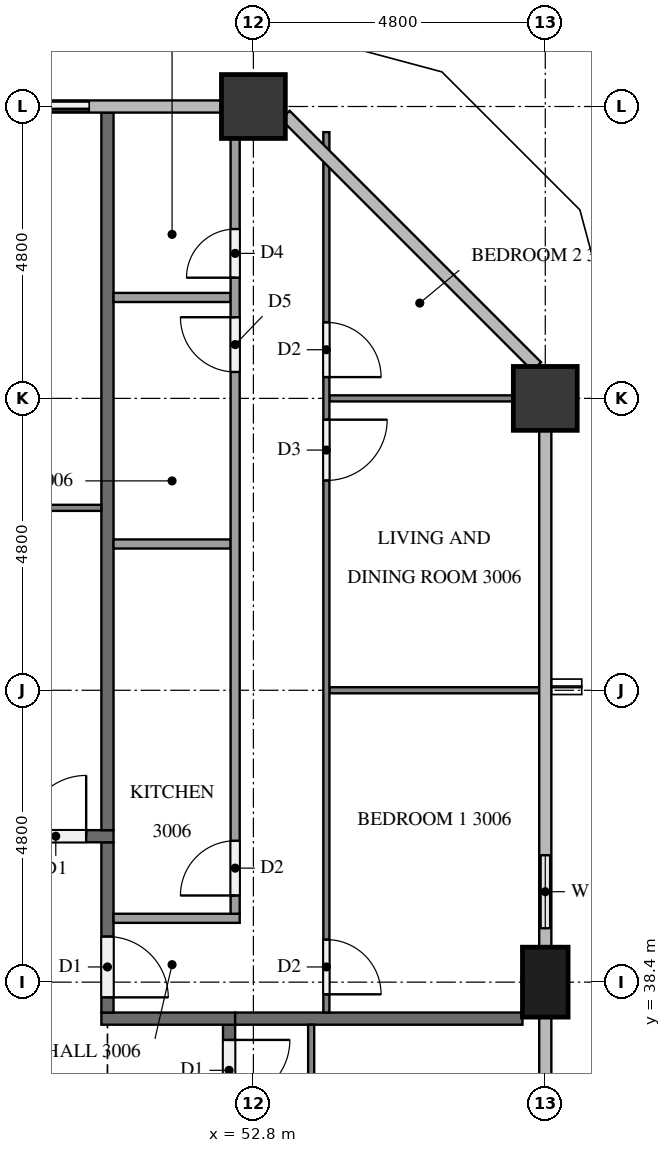
"""IFC4 building model, lengths in metres.
Left out: names, types, materials, properties, quantities, classifications, styles, units other than length and angle.
Written with IfcOpenShell. Run it as: python <this file> out.ifc"""

import sys

from ifc_helpers import new_model, si_unit, direction, frame, frame_2d, origin, origin_2d, place, context, subcontext, project, spatial, rectangle, extrude, element, fill, save


model = new_model("IFC4")
c1 = context("Model", 3, precision=1e-05, world=origin(), true_north=direction((0.0, 1.0)))
c2 = subcontext(c1, "Body", "Model", "MODEL_VIEW")
j1 = project(units=[si_unit("LENGTHUNIT", "METRE"), si_unit("PLANEANGLEUNIT", "RADIAN")], contexts=[c1])
p1 = place(None, origin())
s1 = spatial("IfcSite", under=j1, at=p1, CompositionType="ELEMENT")
p2 = place(p1, origin())
s2 = spatial("IfcBuilding", under=s1, at=p2, CompositionType="ELEMENT")
p3 = place(p2, frame((0.0, 0.0, 119.1)))
s3 = spatial("IfcBuildingStorey", under=s2, at=p3, CompositionType="ELEMENT", Elevation=119.1)
p4 = place(p3, frame((57.6, 38.4, 0.0), z_axis=(0.0, 0.0, 1.0), x_axis=(0.0, 1.0, 0.0)))
e1 = element("IfcColumn", 1, at=p4, inside=s3, PredefinedType="COLUMN", context=c2, shape_type="SweptSolid", body=[
    extrude(rectangle(XDim=1.15, YDim=0.75, at=origin_2d()), origin(), (0.0, 0.0, 1.0), 3.2),
])
for number, where, z_axis, x_axis in (
    (2, (57.6, 48.0, 0.0), (0.0, 0.0, 1.0), (1.0, 0.0, 0.0)),
    (3, (52.8, 52.8, 0.0), (0.0, 0.0, 1.0), (1.0, 0.0, 0.0)),
):
    element("IfcColumn", number, at=place(p3, frame(where, z_axis=z_axis, x_axis=x_axis)), inside=s3, PredefinedType="COLUMN", context=c2, shape_type="SweptSolid", body=[
        extrude(rectangle(XDim=1.05, YDim=1.05, at=origin_2d()), origin(), (0.0, 0.0, 1.0), 3.2),
    ])
p5 = place(p3, frame((57.6, 38.975, 0.0), z_axis=(0.0, 0.0, 1.0), x_axis=(0.0, 1.0, 0.0)))
e4 = element("IfcWall", 4, at=p5, inside=s3, PredefinedType="SOLIDWALL", context=c2, shape_type="SweptSolid", body=[
    extrude(rectangle(XDim=1.825, YDim=0.15, at=frame_2d((0.913, 0.0))), origin(), (0.0, 0.0, 1.0), 3.2),
])
p6 = place(p5, frame((0.312, 0.0, 0.9)))
e5 = element("IfcOpeningElement", 5, at=p6, cuts=e4, PredefinedType="OPENING", context=c2, shape_type="SweptSolid", body=[
    extrude(rectangle(XDim=1.2, YDim=1.4, at=frame_2d((0.6, 0.7))), frame((0.0, 0.085, 0.0), z_axis=(0.0, -1.0, 0.0), x_axis=(1.0, 0.0, 0.0)), (0.0, 0.0, 1.0), 0.17),
])
p7 = place(p3, frame((50.4, 52.8, 0.0), z_axis=(0.0, 0.0, 1.0), x_axis=(-1.0, 0.0, 0.0)))
e6 = element("IfcWall", 6, at=p7, inside=s3, PredefinedType="SOLIDWALL", context=c2, shape_type="SweptSolid", body=[
    extrude(rectangle(XDim=2.4, YDim=0.15, at=frame_2d((1.2, 0.0))), origin(), (0.0, 0.0, 1.0), 3.2),
])
p8 = place(p7, frame((0.3, 0.0, 0.0)))
e7 = element("IfcOpeningElement", 7, at=p8, cuts=e6, PredefinedType="OPENING", context=c2, shape_type="SweptSolid", body=[
    extrude(rectangle(XDim=1.8, YDim=2.4, at=frame_2d((0.9, 1.2))), frame((0.0, 0.085, 0.0), z_axis=(0.0, -1.0, 0.0), x_axis=(1.0, 0.0, 0.0)), (0.0, 0.0, 1.0), 0.17),
])
p9 = place(p3, frame((52.4, 37.7, 0.0), z_axis=(0.0, 0.0, 1.0), x_axis=(0.0, -1.0, 0.0)))
e8 = element("IfcWall", 8, at=p9, inside=s3, PredefinedType="PARTITIONING", context=c2, shape_type="SweptSolid", body=[
    extrude(rectangle(XDim=22.6, YDim=0.2, at=frame_2d((11.3, 0.0))), origin(), (0.0, 0.0, 1.0), 3.2),
])
p10 = place(p9, frame((0.25, 0.0, 0.0)))
e9 = element("IfcOpeningElement", 9, at=p10, cuts=e8, PredefinedType="OPENING", context=c2, shape_type="SweptSolid", body=[
    extrude(rectangle(XDim=1.0, YDim=2.1, at=frame_2d((0.5, 1.05))), frame((0.0, 0.11, 0.0), z_axis=(0.0, -1.0, 0.0), x_axis=(1.0, 0.0, 0.0)), (0.0, 0.0, 1.0), 0.22),
])
p11 = place(p3, frame((52.5, 37.8, 0.0), z_axis=(0.0, 0.0, 1.0), x_axis=(-1.0, 0.0, 0.0)))
e10 = element("IfcWall", 10, at=p11, inside=s3, PredefinedType="PARTITIONING", context=c2, shape_type="SweptSolid", body=[
    extrude(rectangle(XDim=2.2, YDim=0.2, at=frame_2d((1.1, 0.0))), origin(), (0.0, 0.0, 1.0), 3.2),
])
p12 = place(p3, frame((50.4, 40.7, 0.0), z_axis=(0.0, 0.0, 1.0), x_axis=(0.0, -1.0, 0.0)))
e11 = element("IfcWall", 11, at=p12, inside=s3, PredefinedType="PARTITIONING", context=c2, shape_type="SweptSolid", body=[
    extrude(rectangle(XDim=2.8, YDim=0.2, at=frame_2d((1.4, 0.0))), origin(), (0.0, 0.0, 1.0), 3.2),
])
p13 = place(p12, frame((1.55, 0.0, 0.0)))
e12 = element("IfcOpeningElement", 12, at=p13, cuts=e11, PredefinedType="OPENING", context=c2, shape_type="SweptSolid", body=[
    extrude(rectangle(XDim=1.0, YDim=2.1, at=frame_2d((0.5, 1.05))), frame((0.0, 0.11, 0.0), z_axis=(0.0, -1.0, 0.0), x_axis=(1.0, 0.0, 0.0)), (0.0, 0.0, 1.0), 0.22),
])
p14 = place(p3, frame((11.9, 40.8, 0.0), z_axis=(0.0, 0.0, 1.0), x_axis=(1.0, 0.0, 0.0)))
e13 = element("IfcWall", 13, at=p14, inside=s3, PredefinedType="PARTITIONING", context=c2, shape_type="SweptSolid", body=[
    extrude(rectangle(XDim=38.6, YDim=0.2, at=frame_2d((19.3, 0.0))), origin(), (0.0, 0.0, 1.0), 3.2),
])
p15 = place(p14, frame((37.15, 0.0, 0.0)))
e14 = element("IfcOpeningElement", 14, at=p15, cuts=e13, PredefinedType="OPENING", context=c2, shape_type="SweptSolid", body=[
    extrude(rectangle(XDim=1.0, YDim=2.1, at=frame_2d((0.5, 1.05))), frame((0.0, 0.11, 0.0), z_axis=(0.0, -1.0, 0.0), x_axis=(1.0, 0.0, 0.0)), (0.0, 0.0, 1.0), 0.22),
])
p16 = place(p14, frame((27.55, 0.0, 0.0)))
e15 = element("IfcOpeningElement", 15, at=p16, cuts=e13, PredefinedType="OPENING", context=c2, shape_type="SweptSolid", body=[
    extrude(rectangle(XDim=1.0, YDim=2.1, at=frame_2d((0.5, 1.05))), frame((0.0, 0.11, 0.0), z_axis=(0.0, -1.0, 0.0), x_axis=(1.0, 0.0, 0.0)), (0.0, 0.0, 1.0), 0.22),
])
p17 = place(p14, frame((13.15, 0.0, 0.0)))
e16 = element("IfcOpeningElement", 16, at=p17, cuts=e13, PredefinedType="OPENING", context=c2, shape_type="SweptSolid", body=[
    extrude(rectangle(XDim=1.0, YDim=2.1, at=frame_2d((0.5, 1.05))), frame((0.0, 0.11, 0.0), z_axis=(0.0, -1.0, 0.0), x_axis=(1.0, 0.0, 0.0)), (0.0, 0.0, 1.0), 0.22),
])
p18 = place(p3, frame((52.5, 37.8, 0.0), z_axis=(0.0, 0.0, 1.0), x_axis=(1.0, 0.0, 0.0)))
e17 = element("IfcWall", 17, at=p18, inside=s3, PredefinedType="PARTITIONING", context=c2, shape_type="SweptSolid", body=[
    extrude(rectangle(XDim=4.725, YDim=0.2, at=frame_2d((2.363, 0.0))), origin(), (0.0, 0.0, 1.0), 3.2),
])
p19 = place(p3, frame((50.4, 40.9, 0.0), z_axis=(0.0, 0.0, 1.0), x_axis=(0.0, 1.0, 0.0)))
e18 = element("IfcWall", 18, at=p19, inside=s3, PredefinedType="PARTITIONING", context=c2, shape_type="SweptSolid", body=[
    extrude(rectangle(XDim=11.8, YDim=0.2, at=frame_2d((5.9, 0.0))), origin(), (0.0, 0.0, 1.0), 3.2),
])
p20 = place(p3, frame((53.75, 37.7, 0.0), z_axis=(0.0, 0.0, 1.0), x_axis=(0.0, -1.0, 0.0)))
e19 = element("IfcWall", 19, at=p20, inside=s3, PredefinedType="PARTITIONING", context=c2, shape_type="SweptSolid", body=[
    extrude(rectangle(XDim=22.6, YDim=0.1, at=frame_2d((11.3, 0.0))), origin(), (0.0, 0.0, 1.0), 3.2),
])
p21 = place(p20, frame((2.85, 0.0, 0.0)))
e20 = element("IfcOpeningElement", 20, at=p21, cuts=e19, PredefinedType="OPENING", context=c2, shape_type="SweptSolid", body=[
    extrude(rectangle(XDim=0.9, YDim=2.1, at=frame_2d((0.45, 1.05))), frame((0.0, 0.06, 0.0), z_axis=(0.0, -1.0, 0.0), x_axis=(1.0, 0.0, 0.0)), (0.0, 0.0, 1.0), 0.12),
])
p22 = place(p20, frame((4.45, 0.0, 0.0)))
e21 = element("IfcOpeningElement", 21, at=p22, cuts=e19, PredefinedType="OPENING", context=c2, shape_type="SweptSolid", body=[
    extrude(rectangle(XDim=0.8, YDim=2.1, at=frame_2d((0.4, 1.05))), frame((0.0, 0.06, 0.0), z_axis=(0.0, -1.0, 0.0), x_axis=(1.0, 0.0, 0.0)), (0.0, 0.0, 1.0), 0.12),
])
p23 = place(p20, frame((7.65, 0.0, 0.0)))
e22 = element("IfcOpeningElement", 22, at=p23, cuts=e19, PredefinedType="OPENING", context=c2, shape_type="SweptSolid", body=[
    extrude(rectangle(XDim=0.9, YDim=2.1, at=frame_2d((0.45, 1.05))), frame((0.0, 0.06, 0.0), z_axis=(0.0, -1.0, 0.0), x_axis=(1.0, 0.0, 0.0)), (0.0, 0.0, 1.0), 0.12),
])
p24 = place(p20, frame((9.25, 0.0, 0.0)))
e23 = element("IfcOpeningElement", 23, at=p24, cuts=e19, PredefinedType="OPENING", context=c2, shape_type="SweptSolid", body=[
    extrude(rectangle(XDim=0.9, YDim=2.1, at=frame_2d((0.45, 1.05))), frame((0.0, 0.06, 0.0), z_axis=(0.0, -1.0, 0.0), x_axis=(1.0, 0.0, 0.0)), (0.0, 0.0, 1.0), 0.12),
])
p25 = place(p20, frame((17.15, 0.0, 0.0)))
e24 = element("IfcOpeningElement", 24, at=p25, cuts=e19, PredefinedType="OPENING", context=c2, shape_type="SweptSolid", body=[
    extrude(rectangle(XDim=1.0, YDim=2.1, at=frame_2d((0.5, 1.05))), frame((0.0, 0.06, 0.0), z_axis=(0.0, -1.0, 0.0), x_axis=(1.0, 0.0, 0.0)), (0.0, 0.0, 1.0), 0.12),
])
p26 = place(p20, frame((18.85, 0.0, 0.0)))
e25 = element("IfcOpeningElement", 25, at=p26, cuts=e19, PredefinedType="OPENING", context=c2, shape_type="SweptSolid", body=[
    extrude(rectangle(XDim=0.9, YDim=2.1, at=frame_2d((0.45, 1.05))), frame((0.0, 0.06, 0.0), z_axis=(0.0, -1.0, 0.0), x_axis=(1.0, 0.0, 0.0)), (0.0, 0.0, 1.0), 0.12),
])
p27 = place(p3, frame((54.05, 43.2, 0.0), z_axis=(0.0, 0.0, 1.0), x_axis=(1.0, 0.0, 0.0)))
e26 = element("IfcWall", 26, at=p27, inside=s3, PredefinedType="PARTITIONING", context=c2, shape_type="SweptSolid", body=[
    extrude(rectangle(XDim=3.45, YDim=0.1, at=frame_2d((1.725, 0.0))), origin(), (0.0, 0.0, 1.0), 3.2),
])
p28 = place(p3, frame((54.05, 48.0, 0.0), z_axis=(0.0, 0.0, 1.0), x_axis=(1.0, 0.0, 0.0)))
e27 = element("IfcWall", 27, at=p28, inside=s3, PredefinedType="PARTITIONING", context=c2, shape_type="SweptSolid", body=[
    extrude(rectangle(XDim=3.025, YDim=0.1, at=frame_2d((1.512, 0.0))), origin(), (0.0, 0.0, 1.0), 3.2),
])
p29 = place(p3, frame((54.0, 52.378, 0.0), z_axis=(0.0, 0.0, 1.0), x_axis=(0.0, -1.0, 0.0)))
e28 = element("IfcWall", 28, at=p29, inside=s3, PredefinedType="PARTITIONING", context=c2, shape_type="SweptSolid", body=[
    extrude(rectangle(XDim=14.479, YDim=0.1, at=frame_2d((7.239, 0.0))), origin(), (0.0, 0.0, 1.0), 3.2),
])
p30 = place(p29, frame((13.279, 0.0, 0.0)))
e29 = element("IfcOpeningElement", 29, at=p30, cuts=e28, PredefinedType="OPENING", context=c2, shape_type="SweptSolid", body=[
    extrude(rectangle(XDim=0.9, YDim=2.1, at=frame_2d((0.45, 1.05))), frame((0.0, 0.06, 0.0), z_axis=(0.0, -1.0, 0.0), x_axis=(1.0, 0.0, 0.0)), (0.0, 0.0, 1.0), 0.12),
])
p31 = place(p29, frame((4.729, 0.0, 0.0)))
e30 = element("IfcOpeningElement", 30, at=p31, cuts=e28, PredefinedType="OPENING", context=c2, shape_type="SweptSolid", body=[
    extrude(rectangle(XDim=1.0, YDim=2.1, at=frame_2d((0.5, 1.05))), frame((0.0, 0.06, 0.0), z_axis=(0.0, -1.0, 0.0), x_axis=(1.0, 0.0, 0.0)), (0.0, 0.0, 1.0), 0.12),
])
p32 = place(p29, frame((3.128, 0.0, 0.0)))
e31 = element("IfcOpeningElement", 31, at=p32, cuts=e28, PredefinedType="OPENING", context=c2, shape_type="SweptSolid", body=[
    extrude(rectangle(XDim=0.9, YDim=2.1, at=frame_2d((0.45, 1.05))), frame((0.0, 0.06, 0.0), z_axis=(0.0, -1.0, 0.0), x_axis=(1.0, 0.0, 0.0)), (0.0, 0.0, 1.0), 0.12),
])
for number, where, z_axis, x_axis in (
    (32, (50.5, 45.606, 0.0), (0.0, 0.0, 1.0), (1.0, 0.0, 0.0)),
    (33, (50.5, 49.66, 0.0), (0.0, 0.0, 1.0), (1.0, 0.0, 0.0)),
):
    element("IfcWall", number, at=place(p3, frame(where, z_axis=z_axis, x_axis=x_axis)), inside=s3, PredefinedType="PARTITIONING", context=c2, shape_type="SweptSolid", body=[
        extrude(rectangle(XDim=1.925, YDim=0.15, at=frame_2d((0.962, 0.0))), origin(), (0.0, 0.0, 1.0), 3.2),
    ])
p33 = place(p3, frame((50.5, 39.45, 0.0), z_axis=(0.0, 0.0, 1.0), x_axis=(1.0, 0.0, 0.0)))
e34 = element("IfcWall", 34, at=p33, inside=s3, PredefinedType="PARTITIONING", context=c2, shape_type="SweptSolid", body=[
    extrude(rectangle(XDim=2.075, YDim=0.15, at=frame_2d((1.038, 0.0))), origin(), (0.0, 0.0, 1.0), 3.2),
])
p34 = place(p3, frame((52.5, 39.525, 0.0), z_axis=(0.0, 0.0, 1.0), x_axis=(0.0, 1.0, 0.0)))
e35 = element("IfcWall", 35, at=p34, inside=s3, PredefinedType="PARTITIONING", context=c2, shape_type="SweptSolid", body=[
    extrude(rectangle(XDim=12.75, YDim=0.15, at=frame_2d((6.375, 0.0))), origin(), (0.0, 0.0, 1.0), 3.2),
])
p35 = place(p34, frame((0.3, 0.0, 0.0)))
e36 = element("IfcOpeningElement", 36, at=p35, cuts=e35, PredefinedType="OPENING", context=c2, shape_type="SweptSolid", body=[
    extrude(rectangle(XDim=0.9, YDim=2.1, at=frame_2d((0.45, 1.05))), frame((0.0, 0.085, 0.0), z_axis=(0.0, -1.0, 0.0), x_axis=(1.0, 0.0, 0.0)), (0.0, 0.0, 1.0), 0.17),
])
p36 = place(p34, frame((8.91, 0.0, 0.0)))
e37 = element("IfcOpeningElement", 37, at=p36, cuts=e35, PredefinedType="OPENING", context=c2, shape_type="SweptSolid", body=[
    extrude(rectangle(XDim=0.9, YDim=2.1, at=frame_2d((0.45, 1.05))), frame((0.0, 0.085, 0.0), z_axis=(0.0, -1.0, 0.0), x_axis=(1.0, 0.0, 0.0)), (0.0, 0.0, 1.0), 0.17),
])
p37 = place(p34, frame((10.46, 0.0, 0.0)))
e38 = element("IfcOpeningElement", 38, at=p37, cuts=e35, PredefinedType="OPENING", context=c2, shape_type="SweptSolid", body=[
    extrude(rectangle(XDim=0.8, YDim=2.1, at=frame_2d((0.4, 1.05))), frame((0.0, 0.085, 0.0), z_axis=(0.0, -1.0, 0.0), x_axis=(1.0, 0.0, 0.0)), (0.0, 0.0, 1.0), 0.17),
])
p38 = place(p3, frame((40.9, 46.2, 0.0), z_axis=(0.0, 0.0, 1.0), x_axis=(1.0, 0.0, 0.0)))
e39 = element("IfcWall", 39, at=p38, inside=s3, PredefinedType="PARTITIONING", context=c2, shape_type="SweptSolid", body=[
    extrude(rectangle(XDim=9.4, YDim=0.1, at=frame_2d((4.7, 0.0))), origin(), (0.0, 0.0, 1.0), 3.2),
])
p39 = place(p38, frame((5.05, 0.0, 0.0)))
e40 = element("IfcOpeningElement", 40, at=p39, cuts=e39, PredefinedType="OPENING", context=c2, shape_type="SweptSolid", body=[
    extrude(rectangle(XDim=1.0, YDim=2.1, at=frame_2d((0.5, 1.05))), frame((0.0, 0.06, 0.0), z_axis=(0.0, -1.0, 0.0), x_axis=(1.0, 0.0, 0.0)), (0.0, 0.0, 1.0), 0.12),
])
p40 = place(p38, frame((3.45, 0.0, 0.0)))
e41 = element("IfcOpeningElement", 41, at=p40, cuts=e39, PredefinedType="OPENING", context=c2, shape_type="SweptSolid", body=[
    extrude(rectangle(XDim=0.9, YDim=2.1, at=frame_2d((0.45, 1.05))), frame((0.0, 0.06, 0.0), z_axis=(0.0, -1.0, 0.0), x_axis=(1.0, 0.0, 0.0)), (0.0, 0.0, 1.0), 0.12),
])
p41 = place(p6, origin())
e42 = element("IfcWindow", 42, at=p41, inside=s3, PartitioningType="SINGLE_PANEL", PredefinedType="WINDOW", context=c2, shape_type="SweptSolid", body=[
    extrude(rectangle(XDim=1.2, YDim=1.4, at=frame_2d((0.6, 0.7))), frame((0.0, 0.03, 0.0), z_axis=(0.0, -1.0, 0.0), x_axis=(1.0, 0.0, 0.0)), (0.0, 0.0, 1.0), 0.06),
])
fill(e5, e42)
p42 = place(p8, origin())
e43 = element("IfcDoor", 43, at=p42, inside=s3, OperationType="SLIDING_TO_LEFT", PredefinedType="DOOR", context=c2, shape_type="SweptSolid", body=[
    extrude(rectangle(XDim=1.8, YDim=2.4, at=frame_2d((0.9, 1.2))), frame((0.0, 0.025, 0.0), z_axis=(0.0, -1.0, 0.0), x_axis=(1.0, 0.0, 0.0)), (0.0, 0.0, 1.0), 0.05),
])
fill(e7, e43)
p43 = place(p10, origin())
e44 = element("IfcDoor", 44, at=p43, inside=s3, OperationType="SINGLE_SWING_LEFT", PredefinedType="DOOR", context=c2, shape_type="SweptSolid", body=[
    extrude(rectangle(XDim=1.0, YDim=2.1, at=frame_2d((0.5, 1.05))), frame((0.0, 0.025, 0.0), z_axis=(0.0, -1.0, 0.0), x_axis=(1.0, 0.0, 0.0)), (0.0, 0.0, 1.0), 0.05),
])
fill(e9, e44)
p44 = place(p13, origin())
e45 = element("IfcDoor", 45, at=p44, inside=s3, OperationType="SINGLE_SWING_RIGHT", PredefinedType="DOOR", context=c2, shape_type="SweptSolid", body=[
    extrude(rectangle(XDim=1.0, YDim=2.1, at=frame_2d((0.5, 1.05))), frame((0.0, 0.025, 0.0), z_axis=(0.0, -1.0, 0.0), x_axis=(1.0, 0.0, 0.0)), (0.0, 0.0, 1.0), 0.05),
])
fill(e12, e45)
p45 = place(p15, origin())
e46 = element("IfcDoor", 46, at=p45, inside=s3, OperationType="SINGLE_SWING_RIGHT", PredefinedType="DOOR", context=c2, shape_type="SweptSolid", body=[
    extrude(rectangle(XDim=1.0, YDim=2.1, at=frame_2d((0.5, 1.05))), frame((0.0, 0.025, 0.0), z_axis=(0.0, -1.0, 0.0), x_axis=(1.0, 0.0, 0.0)), (0.0, 0.0, 1.0), 0.05),
])
fill(e14, e46)
p46 = place(p30, origin())
e47 = element("IfcDoor", 47, at=p46, inside=s3, OperationType="SINGLE_SWING_RIGHT", PredefinedType="DOOR", context=c2, shape_type="SweptSolid", body=[
    extrude(rectangle(XDim=0.9, YDim=2.1, at=frame_2d((0.45, 1.05))), frame((0.0, 0.025, 0.0), z_axis=(0.0, -1.0, 0.0), x_axis=(1.0, 0.0, 0.0)), (0.0, 0.0, 1.0), 0.05),
])
fill(e29, e47)
p47 = place(p31, origin())
e48 = element("IfcDoor", 48, at=p47, inside=s3, OperationType="SINGLE_SWING_LEFT", PredefinedType="DOOR", context=c2, shape_type="SweptSolid", body=[
    extrude(rectangle(XDim=1.0, YDim=2.1, at=frame_2d((0.5, 1.05))), frame((0.0, 0.025, 0.0), z_axis=(0.0, -1.0, 0.0), x_axis=(1.0, 0.0, 0.0)), (0.0, 0.0, 1.0), 0.05),
])
fill(e30, e48)
p48 = place(p32, origin())
e49 = element("IfcDoor", 49, at=p48, inside=s3, OperationType="SINGLE_SWING_RIGHT", PredefinedType="DOOR", context=c2, shape_type="SweptSolid", body=[
    extrude(rectangle(XDim=0.9, YDim=2.1, at=frame_2d((0.45, 1.05))), frame((0.0, 0.025, 0.0), z_axis=(0.0, -1.0, 0.0), x_axis=(1.0, 0.0, 0.0)), (0.0, 0.0, 1.0), 0.05),
])
fill(e31, e49)
p49 = place(p35, origin())
e50 = element("IfcDoor", 50, at=p49, inside=s3, OperationType="SINGLE_SWING_LEFT", PredefinedType="DOOR", context=c2, shape_type="SweptSolid", body=[
    extrude(rectangle(XDim=0.9, YDim=2.1, at=frame_2d((0.45, 1.05))), frame((0.0, 0.025, 0.0), z_axis=(0.0, -1.0, 0.0), x_axis=(1.0, 0.0, 0.0)), (0.0, 0.0, 1.0), 0.05),
])
fill(e36, e50)
p50 = place(p36, origin())
e51 = element("IfcDoor", 51, at=p50, inside=s3, OperationType="SINGLE_SWING_RIGHT", PredefinedType="DOOR", context=c2, shape_type="SweptSolid", body=[
    extrude(rectangle(XDim=0.9, YDim=2.1, at=frame_2d((0.45, 1.05))), frame((0.0, 0.025, 0.0), z_axis=(0.0, -1.0, 0.0), x_axis=(1.0, 0.0, 0.0)), (0.0, 0.0, 1.0), 0.05),
])
fill(e37, e51)
p51 = place(p37, origin())
e52 = element("IfcDoor", 52, at=p51, inside=s3, OperationType="SINGLE_SWING_LEFT", PredefinedType="DOOR", context=c2, shape_type="SweptSolid", body=[
    extrude(rectangle(XDim=0.8, YDim=2.1, at=frame_2d((0.4, 1.05))), frame((0.0, 0.025, 0.0), z_axis=(0.0, -1.0, 0.0), x_axis=(1.0, 0.0, 0.0)), (0.0, 0.0, 1.0), 0.05),
])
fill(e38, e52)
save(model, sys.argv[1])
